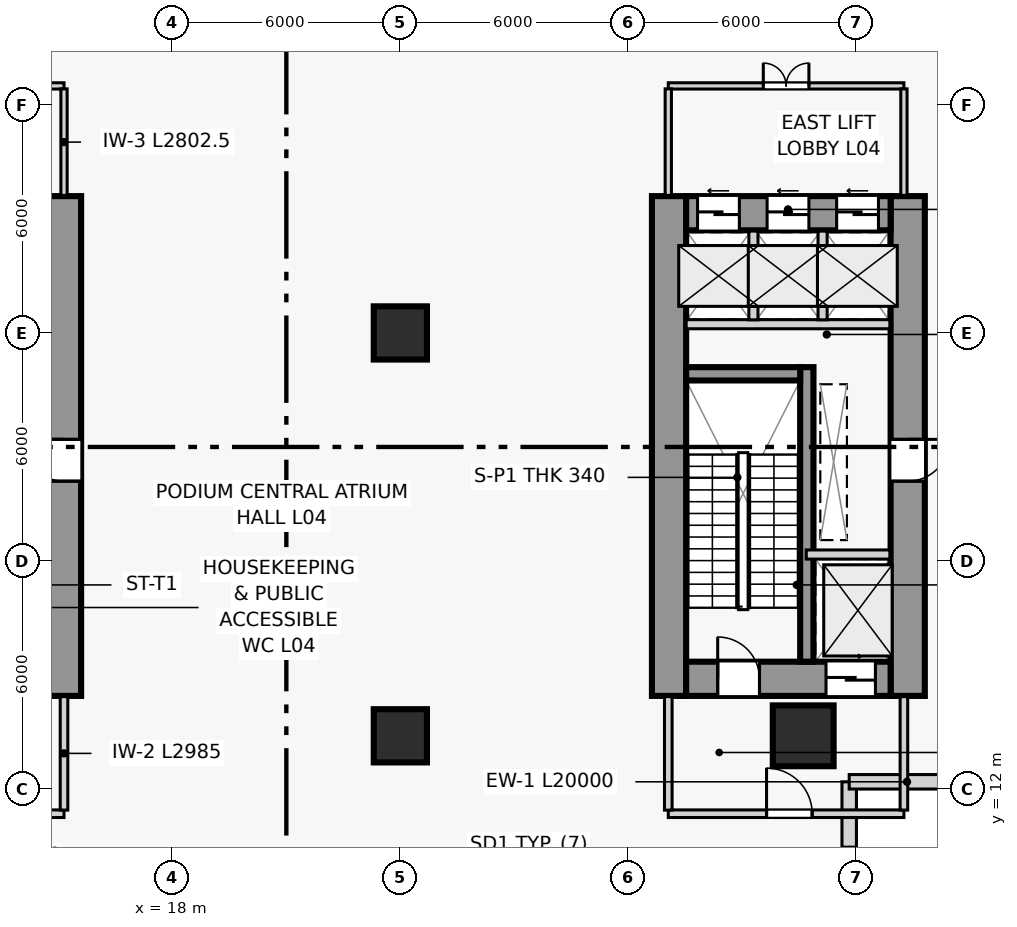
"""IFC4 building model, lengths in metres.
Left out: names, types, materials, properties, quantities, classifications, styles, units other than length and angle.
Written with IfcOpenShell. Run it as: python <this file> out.ifc"""

import sys

from ifc_helpers import new_model, si_unit, direction, frame, frame_2d, origin, origin_2d, place, context, subcontext, project, spatial, rectangle, extrude, source, transform, mapped, element, fill, save


model = new_model("IFC4")
c1 = context("Model", 3, precision=1e-05, world=origin(), true_north=direction((0.0, 1.0)))
c2 = subcontext(c1, "Body", "Model", "MODEL_VIEW")
j1 = project(units=[si_unit("LENGTHUNIT", "METRE"), si_unit("PLANEANGLEUNIT", "RADIAN")], contexts=[c1])
p1 = place(None, origin())
s1 = spatial("IfcSite", under=j1, at=p1, CompositionType="ELEMENT")
p2 = place(p1, origin())
s2 = spatial("IfcBuilding", under=s1, at=p2, CompositionType="ELEMENT")
p3 = place(p2, frame((0.0, 0.0, 18.0)))
s3 = spatial("IfcBuildingStorey", under=s2, at=p3, CompositionType="ELEMENT", Elevation=18.0)
p4 = place(p3, frame((15.15, 14.45, 0.0), z_axis=(0.0, 0.0, 1.0), x_axis=(0.0, 1.0, 0.0)))
e1 = element("IfcWall", 1, at=p4, inside=s3, PredefinedType="SHEAR", context=c2, shape_type="SweptSolid", body=[
    extrude(rectangle(XDim=13.15, YDim=0.9, at=frame_2d((6.575, 0.0))), origin(), (0.0, 0.0, 1.0), 4.5),
])
p5 = place(p4, frame((5.65, 0.0, 0.0)))
e2 = element("IfcOpeningElement", 2, at=p5, cuts=e1, PredefinedType="OPENING", context=c2, shape_type="SweptSolid", body=[
    extrude(rectangle(XDim=1.1, YDim=2.2, at=frame_2d((0.55, 1.1))), frame((0.0, 0.46, 0.0), z_axis=(0.0, -1.0, 0.0), x_axis=(1.0, 0.0, 0.0)), (0.0, 0.0, 1.0), 0.92),
])
p6 = place(p3, frame((31.07, 14.45, 0.0), z_axis=(0.0, 0.0, 1.0), x_axis=(0.0, 1.0, 0.0)))
e3 = element("IfcWall", 3, at=p6, inside=s3, PredefinedType="SHEAR", context=c2, shape_type="SweptSolid", body=[
    extrude(rectangle(XDim=13.15, YDim=0.9, at=frame_2d((6.575, 0.0))), origin(), (0.0, 0.0, 1.0), 4.5),
])
p7 = place(p3, frame((37.35, 14.45, 0.0), z_axis=(0.0, 0.0, 1.0), x_axis=(0.0, 1.0, 0.0)))
e4 = element("IfcWall", 4, at=p7, inside=s3, PredefinedType="SHEAR", context=c2, shape_type="SweptSolid", body=[
    extrude(rectangle(XDim=13.15, YDim=0.9, at=frame_2d((6.575, 0.0))), origin(), (0.0, 0.0, 1.0), 4.5),
])
p8 = place(p7, frame((5.65, 0.0, 0.0)))
e5 = element("IfcOpeningElement", 5, at=p8, cuts=e4, PredefinedType="OPENING", context=c2, shape_type="SweptSolid", body=[
    extrude(rectangle(XDim=1.1, YDim=2.2, at=frame_2d((0.55, 1.1))), frame((0.0, 0.46, 0.0), z_axis=(0.0, -1.0, 0.0), x_axis=(1.0, 0.0, 0.0)), (0.0, 0.0, 1.0), 0.92),
])
p9 = place(p3, frame((31.52, 14.9, 0.0), z_axis=(0.0, 0.0, 1.0), x_axis=(1.0, 0.0, 0.0)))
e6 = element("IfcWall", 6, at=p9, inside=s3, PredefinedType="SHEAR", context=c2, shape_type="SweptSolid", body=[
    extrude(rectangle(XDim=5.38, YDim=0.9, at=frame_2d((2.69, 0.0))), origin(), (0.0, 0.0, 1.0), 4.5),
])
p10 = place(p9, frame((0.83, 0.0, 0.0)))
e7 = element("IfcOpeningElement", 7, at=p10, cuts=e6, PredefinedType="OPENING", context=c2, shape_type="SweptSolid", body=[
    extrude(rectangle(XDim=1.1, YDim=2.2, at=frame_2d((0.55, 1.1))), frame((0.0, 0.46, 0.0), z_axis=(0.0, -1.0, 0.0), x_axis=(1.0, 0.0, 0.0)), (0.0, 0.0, 1.0), 0.92),
])
p11 = place(p9, frame((3.68, 0.0, 0.0)))
e8 = element("IfcOpeningElement", 8, at=p11, cuts=e6, PredefinedType="OPENING", context=c2, shape_type="SweptSolid", body=[
    extrude(rectangle(XDim=1.3, YDim=2.2, at=frame_2d((0.65, 1.1))), frame((0.0, 0.46, 0.0), z_axis=(0.0, -1.0, 0.0), x_axis=(1.0, 0.0, 0.0)), (0.0, 0.0, 1.0), 0.92),
])
p12 = place(p3, frame((31.52, 27.15, 0.0), z_axis=(0.0, 0.0, 1.0), x_axis=(1.0, 0.0, 0.0)))
e9 = element("IfcWall", 9, at=p12, inside=s3, PredefinedType="SHEAR", context=c2, shape_type="SweptSolid", body=[
    extrude(rectangle(XDim=5.38, YDim=0.9, at=frame_2d((2.69, 0.0))), origin(), (0.0, 0.0, 1.0), 4.5),
])
p13 = place(p12, frame((0.3, 0.0, 0.0)))
e10 = element("IfcOpeningElement", 10, at=p13, cuts=e9, PredefinedType="OPENING", context=c2, shape_type="SweptSolid", body=[
    extrude(rectangle(XDim=1.1, YDim=2.2, at=frame_2d((0.55, 1.1))), frame((0.0, 0.46, 0.0), z_axis=(0.0, -1.0, 0.0), x_axis=(1.0, 0.0, 0.0)), (0.0, 0.0, 1.0), 0.92),
])
p14 = place(p12, frame((2.13, 0.0, 0.0)))
e11 = element("IfcOpeningElement", 11, at=p14, cuts=e9, PredefinedType="OPENING", context=c2, shape_type="SweptSolid", body=[
    extrude(rectangle(XDim=1.1, YDim=2.2, at=frame_2d((0.55, 1.1))), frame((0.0, 0.46, 0.0), z_axis=(0.0, -1.0, 0.0), x_axis=(1.0, 0.0, 0.0)), (0.0, 0.0, 1.0), 0.92),
])
p15 = place(p12, frame((3.96, 0.0, 0.0)))
e12 = element("IfcOpeningElement", 12, at=p15, cuts=e9, PredefinedType="OPENING", context=c2, shape_type="SweptSolid", body=[
    extrude(rectangle(XDim=1.1, YDim=2.2, at=frame_2d((0.55, 1.1))), frame((0.0, 0.46, 0.0), z_axis=(0.0, -1.0, 0.0), x_axis=(1.0, 0.0, 0.0)), (0.0, 0.0, 1.0), 0.92),
])
p16 = place(p3, frame((34.695, 15.35, 0.0), z_axis=(0.0, 0.0, 1.0), x_axis=(0.0, 1.0, 0.0)))
e13 = element("IfcWall", 13, at=p16, inside=s3, PredefinedType="SHEAR", context=c2, shape_type="SweptSolid", body=[
    extrude(rectangle(XDim=7.75, YDim=0.35, at=frame_2d((3.875, 0.0))), origin(), (0.0, 0.0, 1.0), 4.5),
])
p17 = place(p3, frame((31.52, 22.925, 0.0), z_axis=(0.0, 0.0, 1.0), x_axis=(1.0, 0.0, 0.0)))
e14 = element("IfcWall", 14, at=p17, inside=s3, PredefinedType="SHEAR", context=c2, shape_type="SweptSolid", body=[
    extrude(rectangle(XDim=3.0, YDim=0.35, at=frame_2d((1.5, 0.0))), origin(), (0.0, 0.0, 1.0), 4.5),
])
m1 = source(origin(), c2, "Body", "SweptSolid", [
    extrude(rectangle(XDim=1.4, YDim=1.4, at=origin_2d()), origin(), (0.0, 0.0, 1.0), 4.5),
])
for number, where, z_axis, x_axis in (
    (15, (24.0, 13.4, 0.0), (0.0, 0.0, 1.0), (1.0, 0.0, 0.0)),
    (16, (24.0, 24.0, 0.0), (0.0, 0.0, 1.0), (1.0, 0.0, 0.0)),
):
    element("IfcColumn", number, at=place(p3, frame(where, z_axis=z_axis, x_axis=x_axis)), inside=s3, PredefinedType="COLUMN", context=c2, shape_type="MappedRepresentation", body=[
        mapped(m1, transform((0.0, 0.0, 0.0), scale=1.0)),
    ])
m2 = source(origin(), c2, "Body", "SweptSolid", [
    extrude(rectangle(XDim=1.6, YDim=1.6, at=origin_2d()), origin(), (0.0, 0.0, 1.0), 4.5),
])
p18 = place(p3, frame((34.6, 13.4, 0.0), z_axis=(0.0, 0.0, 1.0), x_axis=(1.0, 0.0, 0.0)))
e17 = element("IfcColumn", 17, at=p18, inside=s3, PredefinedType="COLUMN", context=c2, shape_type="MappedRepresentation", body=[
    mapped(m2, transform((0.0, 0.0, 0.0), scale=1.0)),
])
p19 = place(p3, frame((35.81, 7.69, 0.0), z_axis=(0.0, 0.0, 1.0), x_axis=(0.0, 1.0, 0.0)))
e18 = element("IfcWall", 18, at=p19, inside=s3, PredefinedType="SOLIDWALL", context=c2, shape_type="SweptSolid", body=[
    extrude(rectangle(XDim=4.5, YDim=0.38, at=frame_2d((2.25, 0.0))), origin(), (0.0, 0.0, 1.0), 3.85),
])
p20 = place(p19, frame((0.98, 0.0, 0.8)))
e19 = element("IfcOpeningElement", 19, at=p20, cuts=e18, PredefinedType="OPENING", context=c2, shape_type="SweptSolid", body=[
    extrude(rectangle(XDim=1.8, YDim=2.1, at=frame_2d((0.9, 1.05))), frame((0.0, 0.2, 0.0), z_axis=(0.0, -1.0, 0.0), x_axis=(1.0, 0.0, 0.0)), (0.0, 0.0, 1.0), 0.4),
])
p21 = place(p3, frame((35.81, 12.19, 0.0), z_axis=(0.0, 0.0, 1.0), x_axis=(1.0, 0.0, 0.0)))
e20 = element("IfcWall", 20, at=p21, inside=s3, PredefinedType="SOLIDWALL", context=c2, shape_type="SweptSolid", body=[
    extrude(rectangle(XDim=20.0, YDim=0.38, at=frame_2d((10.0, 0.0))), origin(), (0.0, 0.0, 1.0), 3.85),
])
p22 = place(p21, frame((3.042, 0.0, 0.8)))
e21 = element("IfcOpeningElement", 21, at=p22, cuts=e20, PredefinedType="OPENING", context=c2, shape_type="SweptSolid", body=[
    extrude(rectangle(XDim=1.8, YDim=2.1, at=frame_2d((0.9, 1.05))), frame((0.0, 0.2, 0.0), z_axis=(0.0, -1.0, 0.0), x_axis=(1.0, 0.0, 0.0)), (0.0, 0.0, 1.0), 0.4),
])
p23 = place(p21, frame((7.528, 0.0, 0.8)))
e22 = element("IfcOpeningElement", 22, at=p23, cuts=e20, PredefinedType="OPENING", context=c2, shape_type="SweptSolid", body=[
    extrude(rectangle(XDim=1.8, YDim=2.1, at=frame_2d((0.9, 1.05))), frame((0.0, 0.2, 0.0), z_axis=(0.0, -1.0, 0.0), x_axis=(1.0, 0.0, 0.0)), (0.0, 0.0, 1.0), 0.4),
])
p24 = place(p21, frame((12.012, 0.0, 0.8)))
e23 = element("IfcOpeningElement", 23, at=p24, cuts=e20, PredefinedType="OPENING", context=c2, shape_type="SweptSolid", body=[
    extrude(rectangle(XDim=1.8, YDim=2.1, at=frame_2d((0.9, 1.05))), frame((0.0, 0.2, 0.0), z_axis=(0.0, -1.0, 0.0), x_axis=(1.0, 0.0, 0.0)), (0.0, 0.0, 1.0), 0.4),
])
p25 = place(p21, frame((16.498, 0.0, 0.8)))
e24 = element("IfcOpeningElement", 24, at=p25, cuts=e20, PredefinedType="OPENING", context=c2, shape_type="SweptSolid", body=[
    extrude(rectangle(XDim=1.8, YDim=2.1, at=frame_2d((0.9, 1.05))), frame((0.0, 0.2, 0.0), z_axis=(0.0, -1.0, 0.0), x_axis=(1.0, 0.0, 0.0)), (0.0, 0.0, 1.0), 0.4),
])
p26 = place(p3, frame((34.68, 18.17, 0.0), z_axis=(0.0, 0.0, 1.0), x_axis=(1.0, 0.0, 0.0)))
e25 = element("IfcWall", 25, at=p26, inside=s3, PredefinedType="PARTITIONING", context=c2, shape_type="SweptSolid", body=[
    extrude(rectangle(XDim=2.2, YDim=0.24, at=frame_2d((1.1, 0.0))), origin(), (0.0, 0.0, 1.0), 3.85),
])
p27 = place(p3, frame((8.05, 11.35, 0.0), z_axis=(0.0, 0.0, 1.0), x_axis=(1.0, 0.0, 0.0)))
e26 = element("IfcWall", 26, at=p27, inside=s3, PredefinedType="PARTITIONING", context=c2, shape_type="SweptSolid", body=[
    extrude(rectangle(XDim=7.1, YDim=0.2, at=frame_2d((3.55, 0.0))), origin(), (0.0, 0.0, 1.0), 3.85),
])
p28 = place(p27, frame((2.846, 0.0, 0.0)))
e27 = element("IfcOpeningElement", 27, at=p28, cuts=e26, PredefinedType="OPENING", context=c2, shape_type="SweptSolid", body=[
    extrude(rectangle(XDim=1.2, YDim=2.2, at=frame_2d((0.6, 1.1))), frame((0.0, 0.11, 0.0), z_axis=(0.0, -1.0, 0.0), x_axis=(1.0, 0.0, 0.0)), (0.0, 0.0, 1.0), 0.22),
])
p29 = place(p3, frame((15.15, 11.445, 0.0), z_axis=(0.0, 0.0, 1.0), x_axis=(0.0, 1.0, 0.0)))
e28 = element("IfcWall", 28, at=p29, inside=s3, PredefinedType="PARTITIONING", context=c2, shape_type="SweptSolid", body=[
    extrude(rectangle(XDim=2.985, YDim=0.2, at=frame_2d((1.492, 0.0))), origin(), (0.0, 0.0, 1.0), 3.85),
])
p30 = place(p3, frame((31.05, 11.35, 0.0), z_axis=(0.0, 0.0, 1.0), x_axis=(1.0, 0.0, 0.0)))
e29 = element("IfcWall", 29, at=p30, inside=s3, PredefinedType="PARTITIONING", context=c2, shape_type="SweptSolid", body=[
    extrude(rectangle(XDim=6.2, YDim=0.2, at=frame_2d((3.1, 0.0))), origin(), (0.0, 0.0, 1.0), 3.85),
])
p31 = place(p30, frame((2.586, 0.0, 0.0)))
e30 = element("IfcOpeningElement", 30, at=p31, cuts=e29, PredefinedType="OPENING", context=c2, shape_type="SweptSolid", body=[
    extrude(rectangle(XDim=1.2, YDim=2.2, at=frame_2d((0.6, 1.1))), frame((0.0, 0.11, 0.0), z_axis=(0.0, -1.0, 0.0), x_axis=(1.0, 0.0, 0.0)), (0.0, 0.0, 1.0), 0.22),
])
p32 = place(p3, frame((31.05, 11.445, 0.0), z_axis=(0.0, 0.0, 1.0), x_axis=(0.0, 1.0, 0.0)))
e31 = element("IfcWall", 31, at=p32, inside=s3, PredefinedType="PARTITIONING", context=c2, shape_type="SweptSolid", body=[
    extrude(rectangle(XDim=2.985, YDim=0.2, at=frame_2d((1.492, 0.0))), origin(), (0.0, 0.0, 1.0), 2.72),
])
p33 = place(p3, frame((37.25, 11.445, 0.0), z_axis=(0.0, 0.0, 1.0), x_axis=(0.0, 1.0, 0.0)))
e32 = element("IfcWall", 32, at=p33, inside=s3, PredefinedType="PARTITIONING", context=c2, shape_type="SweptSolid", body=[
    extrude(rectangle(XDim=2.985, YDim=0.2, at=frame_2d((1.492, 0.0))), origin(), (0.0, 0.0, 1.0), 3.85),
])
p34 = place(p3, frame((31.52, 24.23, 0.0), z_axis=(0.0, 0.0, 1.0), x_axis=(1.0, 0.0, 0.0)))
e33 = element("IfcWall", 33, at=p34, inside=s3, PredefinedType="PARTITIONING", context=c2, shape_type="SweptSolid", body=[
    extrude(rectangle(XDim=5.36, YDim=0.24, at=frame_2d((2.68, 0.0))), origin(), (0.0, 0.0, 1.0), 3.85),
])
for number, where, z_axis, x_axis in (
    (34, (33.29, 24.345, 0.0), (0.0, 0.0, 1.0), (0.0, 1.0, 0.0)),
    (35, (35.11, 24.345, 0.0), (0.0, 0.0, 1.0), (0.0, 1.0, 0.0)),
):
    element("IfcWall", number, at=place(p3, frame(where, z_axis=z_axis, x_axis=x_axis)), inside=s3, PredefinedType="PARTITIONING", context=c2, shape_type="SweptSolid", body=[
        extrude(rectangle(XDim=2.335, YDim=0.24, at=frame_2d((1.167, 0.0))), origin(), (0.0, 0.0, 1.0), 3.85),
    ])
p35 = place(p3, frame((8.05, 30.5, 0.0), z_axis=(0.0, 0.0, 1.0), x_axis=(1.0, 0.0, 0.0)))
e36 = element("IfcWall", 36, at=p35, inside=s3, PredefinedType="PARTITIONING", context=c2, shape_type="SweptSolid", body=[
    extrude(rectangle(XDim=7.1, YDim=0.165, at=frame_2d((3.55, 0.0))), origin(), (0.0, 0.0, 1.0), 3.85),
])
p36 = place(p35, frame((2.95, 0.0, 0.0)))
e37 = element("IfcOpeningElement", 37, at=p36, cuts=e36, PredefinedType="OPENING", context=c2, shape_type="SweptSolid", body=[
    extrude(rectangle(XDim=1.2, YDim=2.2, at=frame_2d((0.6, 1.1))), frame((0.0, 0.093, 0.0), z_axis=(0.0, -1.0, 0.0), x_axis=(1.0, 0.0, 0.0)), (0.0, 0.0, 1.0), 0.185),
])
p37 = place(p3, frame((15.15, 27.62, 0.0), z_axis=(0.0, 0.0, 1.0), x_axis=(0.0, 1.0, 0.0)))
e38 = element("IfcWall", 38, at=p37, inside=s3, PredefinedType="PARTITIONING", context=c2, shape_type="SweptSolid", body=[
    extrude(rectangle(XDim=2.802, YDim=0.165, at=frame_2d((1.401, 0.0))), origin(), (0.0, 0.0, 1.0), 3.85),
])
p38 = place(p3, frame((31.05, 30.5, 0.0), z_axis=(0.0, 0.0, 1.0), x_axis=(1.0, 0.0, 0.0)))
e39 = element("IfcWall", 39, at=p38, inside=s3, PredefinedType="PARTITIONING", context=c2, shape_type="SweptSolid", body=[
    extrude(rectangle(XDim=6.2, YDim=0.165, at=frame_2d((3.1, 0.0))), origin(), (0.0, 0.0, 1.0), 3.85),
])
p39 = place(p38, frame((2.5, 0.0, 0.0)))
e40 = element("IfcOpeningElement", 40, at=p39, cuts=e39, PredefinedType="OPENING", context=c2, shape_type="SweptSolid", body=[
    extrude(rectangle(XDim=1.2, YDim=2.2, at=frame_2d((0.6, 1.1))), frame((0.0, 0.093, 0.0), z_axis=(0.0, -1.0, 0.0), x_axis=(1.0, 0.0, 0.0)), (0.0, 0.0, 1.0), 0.185),
])
p40 = place(p3, frame((31.05, 27.62, 0.0), z_axis=(0.0, 0.0, 1.0), x_axis=(0.0, 1.0, 0.0)))
e41 = element("IfcWall", 41, at=p40, inside=s3, PredefinedType="PARTITIONING", context=c2, shape_type="SweptSolid", body=[
    extrude(rectangle(XDim=2.802, YDim=0.165, at=frame_2d((1.401, 0.0))), origin(), (0.0, 0.0, 1.0), 2.52),
])
p41 = place(p3, frame((37.25, 27.62, 0.0), z_axis=(0.0, 0.0, 1.0), x_axis=(0.0, 1.0, 0.0)))
e42 = element("IfcWall", 42, at=p41, inside=s3, PredefinedType="PARTITIONING", context=c2, shape_type="SweptSolid", body=[
    extrude(rectangle(XDim=2.802, YDim=0.165, at=frame_2d((1.401, 0.0))), origin(), (0.0, 0.0, 1.0), 3.85),
])
m3 = source(origin(), c2, "Body", "SweptSolid", [
    extrude(rectangle(XDim=1.1, YDim=2.2, at=frame_2d((0.55, 1.1))), frame((0.0, 0.025, 0.0), z_axis=(0.0, -1.0, 0.0), x_axis=(1.0, 0.0, 0.0)), (0.0, 0.0, 1.0), 0.05),
])
p42 = place(p10, origin())
e43 = element("IfcDoor", 43, at=p42, inside=s3, OperationType="SINGLE_SWING_LEFT", PredefinedType="DOOR", context=c2, shape_type="MappedRepresentation", body=[
    mapped(m3, transform((0.0, 0.0, 0.0), scale=1.0)),
])
fill(e7, e43)
m4 = source(origin(), c2, "Body", "SweptSolid", [
    extrude(rectangle(XDim=1.3, YDim=2.2, at=frame_2d((0.65, 1.1))), frame((0.0, 0.025, 0.0), z_axis=(0.0, -1.0, 0.0), x_axis=(1.0, 0.0, 0.0)), (0.0, 0.0, 1.0), 0.05),
])
p43 = place(p11, origin())
e44 = element("IfcDoor", 44, at=p43, inside=s3, OperationType="SLIDING_TO_RIGHT", PredefinedType="DOOR", context=c2, shape_type="MappedRepresentation", body=[
    mapped(m4, transform((0.0, 0.0, 0.0), scale=1.0)),
])
fill(e8, e44)
m5 = source(origin(), c2, "Body", "SweptSolid", [
    extrude(rectangle(XDim=1.2, YDim=2.2, at=frame_2d((0.6, 1.1))), frame((0.0, 0.025, 0.0), z_axis=(0.0, -1.0, 0.0), x_axis=(1.0, 0.0, 0.0)), (0.0, 0.0, 1.0), 0.05),
])
p44 = place(p31, origin())
e45 = element("IfcDoor", 45, at=p44, inside=s3, OperationType="SINGLE_SWING_LEFT", PredefinedType="DOOR", context=c2, shape_type="MappedRepresentation", body=[
    mapped(m5, transform((0.0, 0.0, 0.0), scale=1.0)),
])
fill(e30, e45)
m6 = source(origin(), c2, "Body", "SweptSolid", [
    extrude(rectangle(XDim=1.1, YDim=2.2, at=frame_2d((0.55, 1.1))), frame((0.0, 0.025, 0.0), z_axis=(0.0, -1.0, 0.0), x_axis=(1.0, 0.0, 0.0)), (0.0, 0.0, 1.0), 0.05),
])
p45 = place(p13, origin())
e46 = element("IfcDoor", 46, at=p45, inside=s3, OperationType="SLIDING_TO_LEFT", PredefinedType="DOOR", context=c2, shape_type="MappedRepresentation", body=[
    mapped(m6, transform((0.0, 0.0, 0.0), scale=1.0)),
])
fill(e10, e46)
p46 = place(p14, origin())
e47 = element("IfcDoor", 47, at=p46, inside=s3, OperationType="SLIDING_TO_LEFT", PredefinedType="DOOR", context=c2, shape_type="MappedRepresentation", body=[
    mapped(m6, transform((0.0, 0.0, 0.0), scale=1.0)),
])
fill(e11, e47)
p47 = place(p15, origin())
e48 = element("IfcDoor", 48, at=p47, inside=s3, OperationType="SLIDING_TO_LEFT", PredefinedType="DOOR", context=c2, shape_type="MappedRepresentation", body=[
    mapped(m6, transform((0.0, 0.0, 0.0), scale=1.0)),
])
fill(e12, e48)
p48 = place(p39, origin())
e49 = element("IfcDoor", 49, at=p48, inside=s3, OperationType="DOUBLE_DOOR_SINGLE_SWING", PredefinedType="DOOR", context=c2, shape_type="MappedRepresentation", body=[
    mapped(m5, transform((0.0, 0.0, 0.0), scale=1.0)),
])
fill(e40, e49)
p49 = place(p5, origin())
e50 = element("IfcDoor", 50, at=p49, inside=s3, OperationType="SINGLE_SWING_RIGHT", PredefinedType="DOOR", context=c2, shape_type="MappedRepresentation", body=[
    mapped(m3, transform((0.0, 0.0, 0.0), scale=1.0)),
])
fill(e2, e50)
p50 = place(p8, frame((1.1, 0.0, 0.0), z_axis=(0.0, 0.0, 1.0), x_axis=(-1.0, 0.0, 0.0)))
e51 = element("IfcDoor", 51, at=p50, inside=s3, OperationType="SINGLE_SWING_LEFT", PredefinedType="DOOR", context=c2, shape_type="MappedRepresentation", body=[
    mapped(m3, transform((0.0, 0.0, 0.0), scale=1.0)),
])
fill(e5, e51)
save(model, sys.argv[1])
